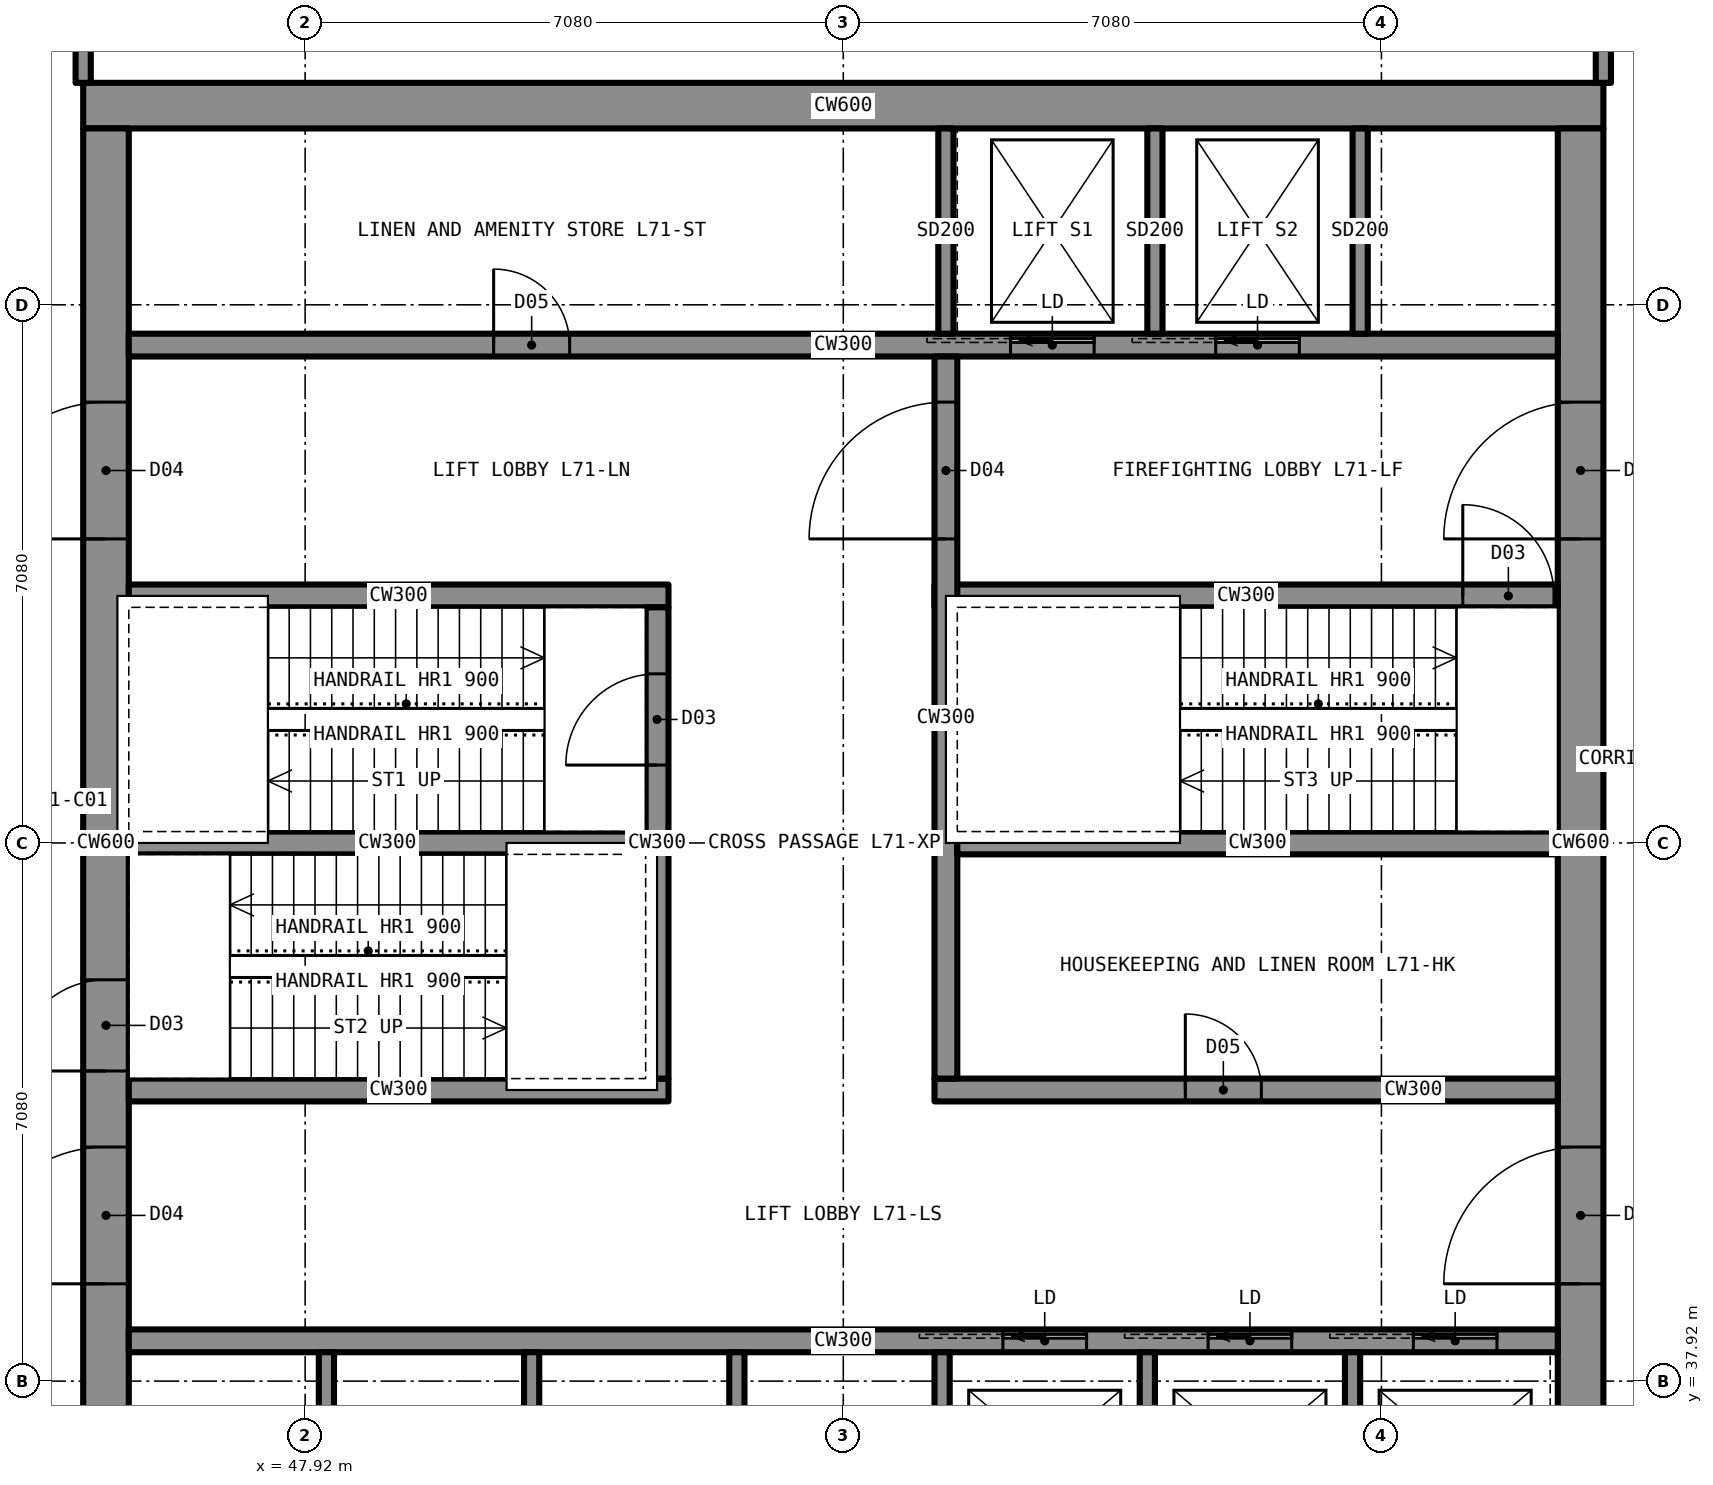
"""IFC4 building model, lengths in metres.
Left out: names, types, materials, properties, quantities, classifications, styles, units other than length and angle.
Written with IfcOpenShell. Run it as: python <this file> out.ifc"""

import sys

from ifc_helpers import new_model, si_unit, direction, frame, frame_2d, origin, place, context, subcontext, project, spatial, rectangle, extrude, element, fill, save


model = new_model("IFC4")
c1 = context("Model", 3, precision=1e-05, world=origin(), true_north=direction((0.0, 1.0)))
c2 = subcontext(c1, "Body", "Model", "MODEL_VIEW")
j1 = project(units=[si_unit("LENGTHUNIT", "METRE"), si_unit("PLANEANGLEUNIT", "RADIAN")], contexts=[c1])
p1 = place(None, origin())
s1 = spatial("IfcSite", under=j1, at=p1, CompositionType="ELEMENT")
p2 = place(p1, origin())
s2 = spatial("IfcBuilding", under=s1, at=p2, CompositionType="ELEMENT")
p3 = place(p2, frame((0.0, 0.0, 261.7)))
s3 = spatial("IfcBuildingStorey", under=s2, at=p3, CompositionType="ELEMENT", Elevation=261.7)
p4 = place(p3, frame((45.0, 54.7, 0.0), z_axis=(0.0, 0.0, 1.0), x_axis=(1.0, 0.0, 0.0)))
e1 = element("IfcWall", 1, at=p4, inside=s3, PredefinedType="SHEAR", context=c2, shape_type="SweptSolid", body=[
    extrude(rectangle(XDim=20.0, YDim=0.6, at=frame_2d((10.0, 0.0))), origin(), (0.0, 0.0, 1.0), 5.0),
])
p5 = place(p3, frame((64.7, 35.6, 0.0), z_axis=(0.0, 0.0, 1.0), x_axis=(0.0, 1.0, 0.0)))
e2 = element("IfcWall", 2, at=p5, inside=s3, PredefinedType="SHEAR", context=c2, shape_type="SweptSolid", body=[
    extrude(rectangle(XDim=18.8, YDim=0.6, at=frame_2d((9.4, 0.0))), origin(), (0.0, 0.0, 1.0), 5.0),
])
p6 = place(p5, frame((13.4, 0.0, 0.0)))
e3 = element("IfcOpeningElement", 3, at=p6, cuts=e2, PredefinedType="OPENING", context=c2, shape_type="SweptSolid", body=[
    extrude(rectangle(XDim=1.8, YDim=2.2, at=frame_2d((0.9, 1.1))), frame((0.0, 0.31, 0.0), z_axis=(0.0, -1.0, 0.0), x_axis=(1.0, 0.0, 0.0)), (0.0, 0.0, 1.0), 0.62),
])
p7 = place(p5, frame((3.6, 0.0, 0.0)))
e4 = element("IfcOpeningElement", 4, at=p7, cuts=e2, PredefinedType="OPENING", context=c2, shape_type="SweptSolid", body=[
    extrude(rectangle(XDim=1.8, YDim=2.2, at=frame_2d((0.9, 1.1))), frame((0.0, 0.31, 0.0), z_axis=(0.0, -1.0, 0.0), x_axis=(1.0, 0.0, 0.0)), (0.0, 0.0, 1.0), 0.62),
])
p8 = place(p3, frame((45.3, 35.6, 0.0), z_axis=(0.0, 0.0, 1.0), x_axis=(0.0, 1.0, 0.0)))
e5 = element("IfcWall", 5, at=p8, inside=s3, PredefinedType="SHEAR", context=c2, shape_type="SweptSolid", body=[
    extrude(rectangle(XDim=18.8, YDim=0.6, at=frame_2d((9.4, 0.0))), origin(), (0.0, 0.0, 1.0), 5.0),
])
p9 = place(p8, frame((13.4, 0.0, 0.0)))
e6 = element("IfcOpeningElement", 6, at=p9, cuts=e5, PredefinedType="OPENING", context=c2, shape_type="SweptSolid", body=[
    extrude(rectangle(XDim=1.8, YDim=2.2, at=frame_2d((0.9, 1.1))), frame((0.0, 0.31, 0.0), z_axis=(0.0, -1.0, 0.0), x_axis=(1.0, 0.0, 0.0)), (0.0, 0.0, 1.0), 0.62),
])
p10 = place(p8, frame((3.6, 0.0, 0.0)))
e7 = element("IfcOpeningElement", 7, at=p10, cuts=e5, PredefinedType="OPENING", context=c2, shape_type="SweptSolid", body=[
    extrude(rectangle(XDim=1.8, YDim=2.2, at=frame_2d((0.9, 1.1))), frame((0.0, 0.31, 0.0), z_axis=(0.0, -1.0, 0.0), x_axis=(1.0, 0.0, 0.0)), (0.0, 0.0, 1.0), 0.62),
])
p11 = place(p8, frame((6.4, 0.0, 0.0)))
e8 = element("IfcOpeningElement", 8, at=p11, cuts=e5, PredefinedType="OPENING", context=c2, shape_type="SweptSolid", body=[
    extrude(rectangle(XDim=1.2, YDim=2.2, at=frame_2d((0.6, 1.1))), frame((0.0, 0.31, 0.0), z_axis=(0.0, -1.0, 0.0), x_axis=(1.0, 0.0, 0.0)), (0.0, 0.0, 1.0), 0.62),
])
p12 = place(p3, frame((45.6, 51.55, 0.0), z_axis=(0.0, 0.0, 1.0), x_axis=(1.0, 0.0, 0.0)))
e9 = element("IfcWall", 9, at=p12, inside=s3, PredefinedType="SHEAR", context=c2, shape_type="SweptSolid", body=[
    extrude(rectangle(XDim=18.8, YDim=0.3, at=frame_2d((9.4, 0.0))), origin(), (0.0, 0.0, 1.0), 5.0),
])
p13 = place(p12, frame((4.8, 0.0, 0.0)))
e10 = element("IfcOpeningElement", 10, at=p13, cuts=e9, PredefinedType="OPENING", context=c2, shape_type="SweptSolid", body=[
    extrude(rectangle(XDim=1.0, YDim=2.1, at=frame_2d((0.5, 1.05))), frame((0.0, 0.16, 0.0), z_axis=(0.0, -1.0, 0.0), x_axis=(1.0, 0.0, 0.0)), (0.0, 0.0, 1.0), 0.32),
])
p14 = place(p12, frame((11.6, 0.0, 0.0)))
e11 = element("IfcOpeningElement", 11, at=p14, cuts=e9, PredefinedType="OPENING", context=c2, shape_type="SweptSolid", body=[
    extrude(rectangle(XDim=1.1, YDim=2.2, at=frame_2d((0.55, 1.1))), frame((0.0, 0.16, 0.0), z_axis=(0.0, -1.0, 0.0), x_axis=(1.0, 0.0, 0.0)), (0.0, 0.0, 1.0), 0.32),
])
p15 = place(p12, frame((14.3, 0.0, 0.0)))
e12 = element("IfcOpeningElement", 12, at=p15, cuts=e9, PredefinedType="OPENING", context=c2, shape_type="SweptSolid", body=[
    extrude(rectangle(XDim=1.1, YDim=2.2, at=frame_2d((0.55, 1.1))), frame((0.0, 0.16, 0.0), z_axis=(0.0, -1.0, 0.0), x_axis=(1.0, 0.0, 0.0)), (0.0, 0.0, 1.0), 0.32),
])
p16 = place(p3, frame((45.6, 38.45, 0.0), z_axis=(0.0, 0.0, 1.0), x_axis=(1.0, 0.0, 0.0)))
e13 = element("IfcWall", 13, at=p16, inside=s3, PredefinedType="SHEAR", context=c2, shape_type="SweptSolid", body=[
    extrude(rectangle(XDim=18.8, YDim=0.3, at=frame_2d((9.4, 0.0))), origin(), (0.0, 0.0, 1.0), 5.0),
])
p17 = place(p16, frame((11.5, 0.0, 0.0)))
e14 = element("IfcOpeningElement", 14, at=p17, cuts=e13, PredefinedType="OPENING", context=c2, shape_type="SweptSolid", body=[
    extrude(rectangle(XDim=1.1, YDim=2.2, at=frame_2d((0.55, 1.1))), frame((0.0, 0.16, 0.0), z_axis=(0.0, -1.0, 0.0), x_axis=(1.0, 0.0, 0.0)), (0.0, 0.0, 1.0), 0.32),
])
p18 = place(p16, frame((14.2, 0.0, 0.0)))
e15 = element("IfcOpeningElement", 15, at=p18, cuts=e13, PredefinedType="OPENING", context=c2, shape_type="SweptSolid", body=[
    extrude(rectangle(XDim=1.1, YDim=2.2, at=frame_2d((0.55, 1.1))), frame((0.0, 0.16, 0.0), z_axis=(0.0, -1.0, 0.0), x_axis=(1.0, 0.0, 0.0)), (0.0, 0.0, 1.0), 0.32),
])
p19 = place(p16, frame((16.9, 0.0, 0.0)))
e16 = element("IfcOpeningElement", 16, at=p19, cuts=e13, PredefinedType="OPENING", context=c2, shape_type="SweptSolid", body=[
    extrude(rectangle(XDim=1.1, YDim=2.2, at=frame_2d((0.55, 1.1))), frame((0.0, 0.16, 0.0), z_axis=(0.0, -1.0, 0.0), x_axis=(1.0, 0.0, 0.0)), (0.0, 0.0, 1.0), 0.32),
])
p20 = place(p3, frame((45.6, 48.25, 0.0), z_axis=(0.0, 0.0, 1.0), x_axis=(1.0, 0.0, 0.0)))
e17 = element("IfcWall", 17, at=p20, inside=s3, PredefinedType="SHEAR", context=c2, shape_type="SweptSolid", body=[
    extrude(rectangle(XDim=7.1, YDim=0.3, at=frame_2d((3.55, 0.0))), origin(), (0.0, 0.0, 1.0), 5.0),
])
p21 = place(p3, frame((56.2, 48.25, 0.0), z_axis=(0.0, 0.0, 1.0), x_axis=(1.0, 0.0, 0.0)))
e18 = element("IfcWall", 18, at=p21, inside=s3, PredefinedType="SHEAR", context=c2, shape_type="SweptSolid", body=[
    extrude(rectangle(XDim=8.2, YDim=0.3, at=frame_2d((4.1, 0.0))), origin(), (0.0, 0.0, 1.0), 5.0),
])
p22 = place(p21, frame((6.95, 0.0, 0.0)))
e19 = element("IfcOpeningElement", 19, at=p22, cuts=e18, PredefinedType="OPENING", context=c2, shape_type="SweptSolid", body=[
    extrude(rectangle(XDim=1.2, YDim=2.2, at=frame_2d((0.6, 1.1))), frame((0.0, 0.16, 0.0), z_axis=(0.0, -1.0, 0.0), x_axis=(1.0, 0.0, 0.0)), (0.0, 0.0, 1.0), 0.32),
])
p23 = place(p3, frame((45.6, 41.75, 0.0), z_axis=(0.0, 0.0, 1.0), x_axis=(1.0, 0.0, 0.0)))
e20 = element("IfcWall", 20, at=p23, inside=s3, PredefinedType="SHEAR", context=c2, shape_type="SweptSolid", body=[
    extrude(rectangle(XDim=7.1, YDim=0.3, at=frame_2d((3.55, 0.0))), origin(), (0.0, 0.0, 1.0), 5.0),
])
p24 = place(p3, frame((56.2, 41.75, 0.0), z_axis=(0.0, 0.0, 1.0), x_axis=(1.0, 0.0, 0.0)))
e21 = element("IfcWall", 21, at=p24, inside=s3, PredefinedType="SHEAR", context=c2, shape_type="SweptSolid", body=[
    extrude(rectangle(XDim=8.2, YDim=0.3, at=frame_2d((4.1, 0.0))), origin(), (0.0, 0.0, 1.0), 5.0),
])
p25 = place(p24, frame((3.3, 0.0, 0.0)))
e22 = element("IfcOpeningElement", 22, at=p25, cuts=e21, PredefinedType="OPENING", context=c2, shape_type="SweptSolid", body=[
    extrude(rectangle(XDim=1.0, YDim=2.1, at=frame_2d((0.5, 1.05))), frame((0.0, 0.16, 0.0), z_axis=(0.0, -1.0, 0.0), x_axis=(1.0, 0.0, 0.0)), (0.0, 0.0, 1.0), 0.32),
])
p26 = place(p3, frame((52.55, 41.9, 0.0), z_axis=(0.0, 0.0, 1.0), x_axis=(0.0, 1.0, 0.0)))
e23 = element("IfcWall", 23, at=p26, inside=s3, PredefinedType="SHEAR", context=c2, shape_type="SweptSolid", body=[
    extrude(rectangle(XDim=6.2, YDim=0.3, at=frame_2d((3.1, 0.0))), origin(), (0.0, 0.0, 1.0), 5.0),
])
p27 = place(p26, frame((4.125, 0.0, 0.0)))
e24 = element("IfcOpeningElement", 24, at=p27, cuts=e23, PredefinedType="OPENING", context=c2, shape_type="SweptSolid", body=[
    extrude(rectangle(XDim=1.2, YDim=2.2, at=frame_2d((0.6, 1.1))), frame((0.0, 0.16, 0.0), z_axis=(0.0, -1.0, 0.0), x_axis=(1.0, 0.0, 0.0)), (0.0, 0.0, 1.0), 0.32),
])
p28 = place(p3, frame((56.35, 41.9, 0.0), z_axis=(0.0, 0.0, 1.0), x_axis=(0.0, 1.0, 0.0)))
e25 = element("IfcWall", 25, at=p28, inside=s3, PredefinedType="SHEAR", context=c2, shape_type="SweptSolid", body=[
    extrude(rectangle(XDim=9.5, YDim=0.3, at=frame_2d((4.75, 0.0))), origin(), (0.0, 0.0, 1.0), 5.0),
])
p29 = place(p28, frame((7.1, 0.0, 0.0)))
e26 = element("IfcOpeningElement", 26, at=p29, cuts=e25, PredefinedType="OPENING", context=c2, shape_type="SweptSolid", body=[
    extrude(rectangle(XDim=1.8, YDim=2.2, at=frame_2d((0.9, 1.1))), frame((0.0, 0.16, 0.0), z_axis=(0.0, -1.0, 0.0), x_axis=(1.0, 0.0, 0.0)), (0.0, 0.0, 1.0), 0.32),
])
p30 = place(p3, frame((45.6, 45.0, 0.0), z_axis=(0.0, 0.0, 1.0), x_axis=(1.0, 0.0, 0.0)))
e27 = element("IfcWall", 27, at=p30, inside=s3, PredefinedType="SHEAR", context=c2, shape_type="SweptSolid", body=[
    extrude(rectangle(XDim=6.8, YDim=0.3, at=frame_2d((3.4, 0.0))), origin(), (0.0, 0.0, 1.0), 5.0),
])
p31 = place(p3, frame((56.5, 45.0, 0.0), z_axis=(0.0, 0.0, 1.0), x_axis=(1.0, 0.0, 0.0)))
e28 = element("IfcWall", 28, at=p31, inside=s3, PredefinedType="SHEAR", context=c2, shape_type="SweptSolid", body=[
    extrude(rectangle(XDim=7.9, YDim=0.3, at=frame_2d((3.95, 0.0))), origin(), (0.0, 0.0, 1.0), 5.0),
])
for number, where, z_axis, x_axis in (
    (29, (45.0, 55.0, 0.0), (0.0, 0.0, 1.0), (0.0, 1.0, 0.0)),
    (30, (65.0, 55.0, 0.0), (0.0, 0.0, 1.0), (0.0, 1.0, 0.0)),
):
    element("IfcWall", number, at=place(p3, frame(where, z_axis=z_axis, x_axis=x_axis)), inside=s3, PredefinedType="PARTITIONING", context=c2, shape_type="SweptSolid", body=[
        extrude(rectangle(XDim=1.8, YDim=0.2, at=frame_2d((0.9, 0.0))), origin(), (0.0, 0.0, 1.0), 4.83),
    ])
for number, where, z_axis, x_axis in (
    (31, (59.1, 51.7, 0.0), (0.0, 0.0, 1.0), (0.0, 1.0, 0.0)),
    (32, (61.8, 51.7, 0.0), (0.0, 0.0, 1.0), (0.0, 1.0, 0.0)),
    (33, (56.35, 51.7, 0.0), (0.0, 0.0, 1.0), (0.0, 1.0, 0.0)),
    (34, (48.2, 35.6, 0.0), (0.0, 0.0, 1.0), (0.0, 1.0, 0.0)),
    (35, (50.9, 35.6, 0.0), (0.0, 0.0, 1.0), (0.0, 1.0, 0.0)),
    (36, (53.6, 35.6, 0.0), (0.0, 0.0, 1.0), (0.0, 1.0, 0.0)),
    (37, (56.3, 35.6, 0.0), (0.0, 0.0, 1.0), (0.0, 1.0, 0.0)),
    (38, (59.0, 35.6, 0.0), (0.0, 0.0, 1.0), (0.0, 1.0, 0.0)),
    (39, (61.7, 35.6, 0.0), (0.0, 0.0, 1.0), (0.0, 1.0, 0.0)),
):
    element("IfcWall", number, at=place(p3, frame(where, z_axis=z_axis, x_axis=x_axis)), inside=s3, PredefinedType="PARTITIONING", context=c2, shape_type="SweptSolid", body=[
        extrude(rectangle(XDim=2.7, YDim=0.2, at=frame_2d((1.35, 0.0))), origin(), (0.0, 0.0, 1.0), 4.83),
    ])
p32 = place(p9, origin())
e40 = element("IfcDoor", 40, at=p32, inside=s3, OperationType="DOUBLE_DOOR_SINGLE_SWING", PredefinedType="DOOR", context=c2, shape_type="SweptSolid", body=[
    extrude(rectangle(XDim=1.8, YDim=2.2, at=frame_2d((0.9, 1.1))), frame((0.0, 0.025, 0.0), z_axis=(0.0, -1.0, 0.0), x_axis=(1.0, 0.0, 0.0)), (0.0, 0.0, 1.0), 0.05),
])
fill(e6, e40)
p33 = place(p10, origin())
e41 = element("IfcDoor", 41, at=p33, inside=s3, OperationType="DOUBLE_DOOR_SINGLE_SWING", PredefinedType="DOOR", context=c2, shape_type="SweptSolid", body=[
    extrude(rectangle(XDim=1.8, YDim=2.2, at=frame_2d((0.9, 1.1))), frame((0.0, 0.025, 0.0), z_axis=(0.0, -1.0, 0.0), x_axis=(1.0, 0.0, 0.0)), (0.0, 0.0, 1.0), 0.05),
])
fill(e7, e41)
p34 = place(p6, origin())
e42 = element("IfcDoor", 42, at=p34, inside=s3, OperationType="DOUBLE_DOOR_SINGLE_SWING", PredefinedType="DOOR", context=c2, shape_type="SweptSolid", body=[
    extrude(rectangle(XDim=1.8, YDim=2.2, at=frame_2d((0.9, 1.1))), frame((0.0, 0.025, 0.0), z_axis=(0.0, -1.0, 0.0), x_axis=(1.0, 0.0, 0.0)), (0.0, 0.0, 1.0), 0.05),
])
fill(e3, e42)
p35 = place(p7, origin())
e43 = element("IfcDoor", 43, at=p35, inside=s3, OperationType="DOUBLE_DOOR_SINGLE_SWING", PredefinedType="DOOR", context=c2, shape_type="SweptSolid", body=[
    extrude(rectangle(XDim=1.8, YDim=2.2, at=frame_2d((0.9, 1.1))), frame((0.0, 0.025, 0.0), z_axis=(0.0, -1.0, 0.0), x_axis=(1.0, 0.0, 0.0)), (0.0, 0.0, 1.0), 0.05),
])
fill(e4, e43)
p36 = place(p29, origin())
e44 = element("IfcDoor", 44, at=p36, inside=s3, OperationType="DOUBLE_DOOR_SINGLE_SWING", PredefinedType="DOOR", context=c2, shape_type="SweptSolid", body=[
    extrude(rectangle(XDim=1.8, YDim=2.2, at=frame_2d((0.9, 1.1))), frame((0.0, 0.025, 0.0), z_axis=(0.0, -1.0, 0.0), x_axis=(1.0, 0.0, 0.0)), (0.0, 0.0, 1.0), 0.05),
])
fill(e26, e44)
p37 = place(p27, origin())
e45 = element("IfcDoor", 45, at=p37, inside=s3, OperationType="SINGLE_SWING_LEFT", PredefinedType="DOOR", context=c2, shape_type="SweptSolid", body=[
    extrude(rectangle(XDim=1.2, YDim=2.2, at=frame_2d((0.6, 1.1))), frame((0.0, 0.025, 0.0), z_axis=(0.0, -1.0, 0.0), x_axis=(1.0, 0.0, 0.0)), (0.0, 0.0, 1.0), 0.05),
])
fill(e24, e45)
p38 = place(p11, origin())
e46 = element("IfcDoor", 46, at=p38, inside=s3, OperationType="SINGLE_SWING_LEFT", PredefinedType="DOOR", context=c2, shape_type="SweptSolid", body=[
    extrude(rectangle(XDim=1.2, YDim=2.2, at=frame_2d((0.6, 1.1))), frame((0.0, 0.025, 0.0), z_axis=(0.0, -1.0, 0.0), x_axis=(1.0, 0.0, 0.0)), (0.0, 0.0, 1.0), 0.05),
])
fill(e8, e46)
p39 = place(p22, origin())
e47 = element("IfcDoor", 47, at=p39, inside=s3, OperationType="SINGLE_SWING_LEFT", PredefinedType="DOOR", context=c2, shape_type="SweptSolid", body=[
    extrude(rectangle(XDim=1.2, YDim=2.2, at=frame_2d((0.6, 1.1))), frame((0.0, 0.025, 0.0), z_axis=(0.0, -1.0, 0.0), x_axis=(1.0, 0.0, 0.0)), (0.0, 0.0, 1.0), 0.05),
])
fill(e19, e47)
p40 = place(p25, origin())
e48 = element("IfcDoor", 48, at=p40, inside=s3, OperationType="SINGLE_SWING_LEFT", PredefinedType="DOOR", context=c2, shape_type="SweptSolid", body=[
    extrude(rectangle(XDim=1.0, YDim=2.1, at=frame_2d((0.5, 1.05))), frame((0.0, 0.025, 0.0), z_axis=(0.0, -1.0, 0.0), x_axis=(1.0, 0.0, 0.0)), (0.0, 0.0, 1.0), 0.05),
])
fill(e22, e48)
p41 = place(p13, origin())
e49 = element("IfcDoor", 49, at=p41, inside=s3, OperationType="SINGLE_SWING_LEFT", PredefinedType="DOOR", context=c2, shape_type="SweptSolid", body=[
    extrude(rectangle(XDim=1.0, YDim=2.1, at=frame_2d((0.5, 1.05))), frame((0.0, 0.025, 0.0), z_axis=(0.0, -1.0, 0.0), x_axis=(1.0, 0.0, 0.0)), (0.0, 0.0, 1.0), 0.05),
])
fill(e10, e49)
p42 = place(p14, origin())
e50 = element("IfcDoor", 50, at=p42, inside=s3, OperationType="SLIDING_TO_LEFT", PredefinedType="DOOR", context=c2, shape_type="SweptSolid", body=[
    extrude(rectangle(XDim=1.1, YDim=2.2, at=frame_2d((0.55, 1.1))), frame((0.0, 0.025, 0.0), z_axis=(0.0, -1.0, 0.0), x_axis=(1.0, 0.0, 0.0)), (0.0, 0.0, 1.0), 0.05),
])
fill(e11, e50)
p43 = place(p15, origin())
e51 = element("IfcDoor", 51, at=p43, inside=s3, OperationType="SLIDING_TO_LEFT", PredefinedType="DOOR", context=c2, shape_type="SweptSolid", body=[
    extrude(rectangle(XDim=1.1, YDim=2.2, at=frame_2d((0.55, 1.1))), frame((0.0, 0.025, 0.0), z_axis=(0.0, -1.0, 0.0), x_axis=(1.0, 0.0, 0.0)), (0.0, 0.0, 1.0), 0.05),
])
fill(e12, e51)
p44 = place(p17, origin())
e52 = element("IfcDoor", 52, at=p44, inside=s3, OperationType="SLIDING_TO_LEFT", PredefinedType="DOOR", context=c2, shape_type="SweptSolid", body=[
    extrude(rectangle(XDim=1.1, YDim=2.2, at=frame_2d((0.55, 1.1))), frame((0.0, 0.025, 0.0), z_axis=(0.0, -1.0, 0.0), x_axis=(1.0, 0.0, 0.0)), (0.0, 0.0, 1.0), 0.05),
])
fill(e14, e52)
p45 = place(p18, origin())
e53 = element("IfcDoor", 53, at=p45, inside=s3, OperationType="SLIDING_TO_LEFT", PredefinedType="DOOR", context=c2, shape_type="SweptSolid", body=[
    extrude(rectangle(XDim=1.1, YDim=2.2, at=frame_2d((0.55, 1.1))), frame((0.0, 0.025, 0.0), z_axis=(0.0, -1.0, 0.0), x_axis=(1.0, 0.0, 0.0)), (0.0, 0.0, 1.0), 0.05),
])
fill(e15, e53)
p46 = place(p19, origin())
e54 = element("IfcDoor", 54, at=p46, inside=s3, OperationType="SLIDING_TO_LEFT", PredefinedType="DOOR", context=c2, shape_type="SweptSolid", body=[
    extrude(rectangle(XDim=1.1, YDim=2.2, at=frame_2d((0.55, 1.1))), frame((0.0, 0.025, 0.0), z_axis=(0.0, -1.0, 0.0), x_axis=(1.0, 0.0, 0.0)), (0.0, 0.0, 1.0), 0.05),
])
fill(e16, e54)
save(model, sys.argv[1])
